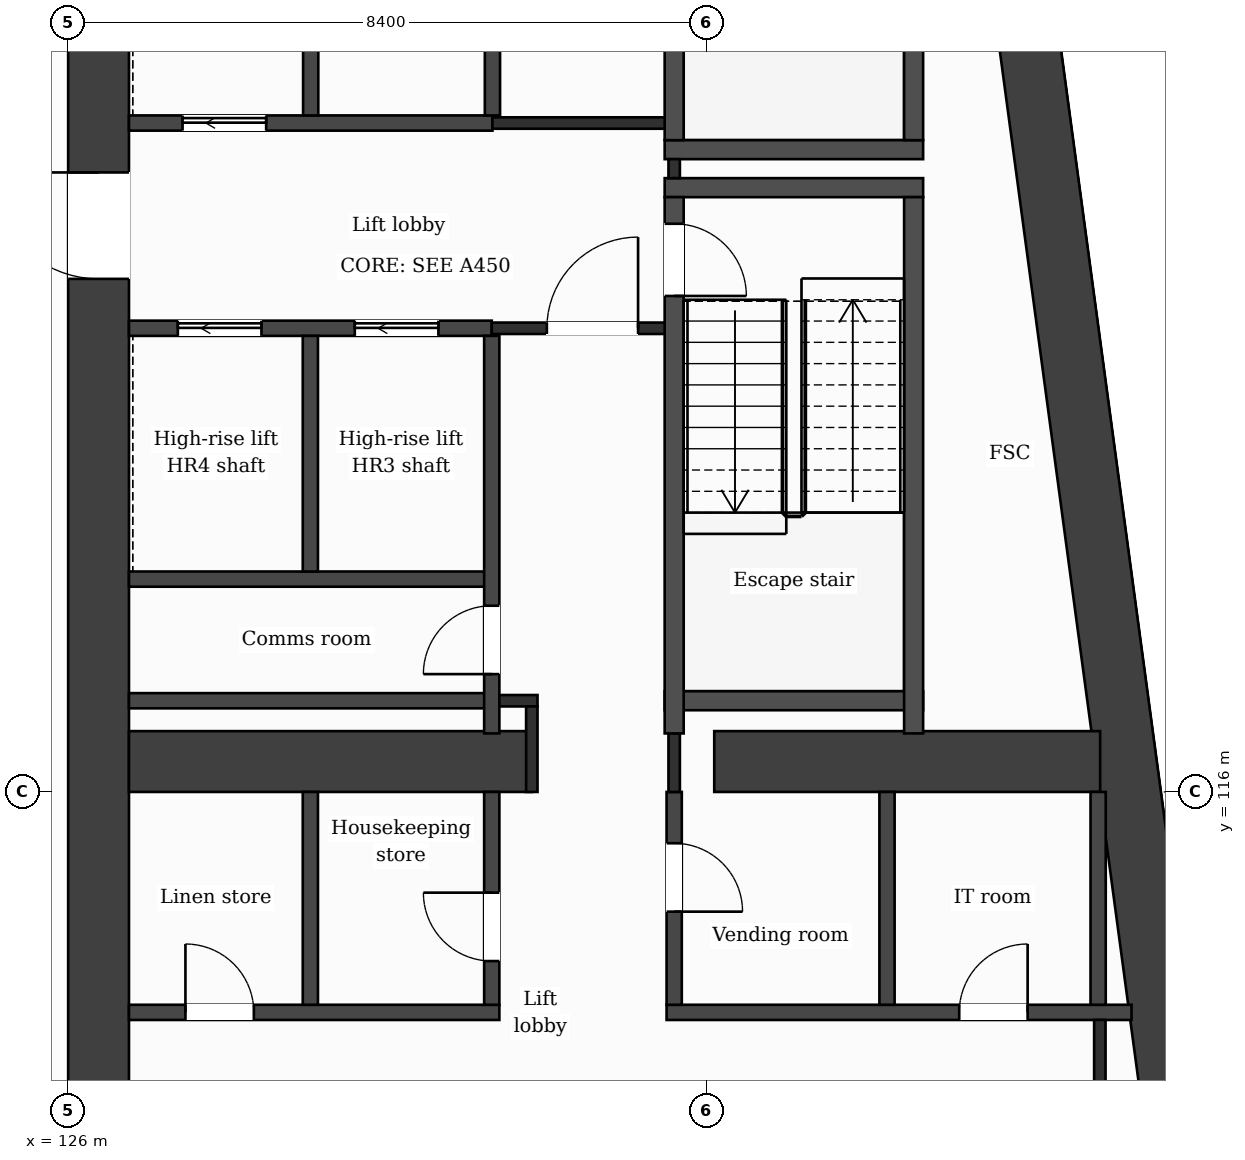
"""IFC4 building model, lengths in metres.
Left out: names, types, materials, properties, quantities, classifications, styles, units other than length and angle.
Written with IfcOpenShell. Run it as: python <this file> out.ifc"""

import sys

from ifc_helpers import new_model, si_unit, direction, frame, frame_2d, origin, place, context, subcontext, project, spatial, rectangle, extrude, element, fill, save


model = new_model("IFC4")
c1 = context("Model", 3, precision=1e-05, world=origin(), true_north=direction((0.0, 1.0)))
c2 = subcontext(c1, "Body", "Model", "MODEL_VIEW")
j1 = project(units=[si_unit("LENGTHUNIT", "METRE"), si_unit("PLANEANGLEUNIT", "RADIAN")], contexts=[c1])
p1 = place(None, origin())
s1 = spatial("IfcSite", under=j1, at=p1, CompositionType="ELEMENT")
p2 = place(p1, origin())
s2 = spatial("IfcBuilding", under=s1, at=p2, CompositionType="ELEMENT")
p3 = place(p2, frame((0.0, 0.0, 205.9)))
s3 = spatial("IfcBuildingStorey", under=s2, at=p3, CompositionType="ELEMENT", Elevation=205.9)
p4 = place(p3, frame((137.82, 132.0, 0.0), z_axis=(0.0, 0.0, 1.0), x_axis=(0.133408347329, -0.991061154956, 0.0)))
e1 = element("IfcWall", 1, at=p4, inside=s3, PredefinedType="SHEAR", context=c2, shape_type="SweptSolid", body=[
    extrude(rectangle(XDim=21.391, YDim=0.8, at=frame_2d((10.696, 0.0))), origin(), (0.0, 0.0, 1.0), 3.7),
])
p5 = place(p3, frame((126.4, 110.8, 0.0), z_axis=(0.0, 0.0, 1.0), x_axis=(0.0, 1.0, 0.0)))
e2 = element("IfcWall", 2, at=p5, inside=s3, PredefinedType="SHEAR", context=c2, shape_type="SweptSolid", body=[
    extrude(rectangle(XDim=21.2, YDim=0.8, at=frame_2d((10.6, 0.0))), origin(), (0.0, 0.0, 1.0), 3.7),
])
p6 = place(p5, frame((11.95, 0.0, 0.0)))
e3 = element("IfcOpeningElement", 3, at=p6, cuts=e2, PredefinedType="OPENING", context=c2, shape_type="SweptSolid", body=[
    extrude(rectangle(XDim=1.4, YDim=2.1, at=frame_2d((0.7, 1.05))), frame((0.0, 0.41, 0.0), z_axis=(0.0, -1.0, 0.0), x_axis=(1.0, 0.0, 0.0)), (0.0, 0.0, 1.0), 0.82),
])
p7 = place(p3, frame((126.8, 116.4, 0.0), z_axis=(0.0, 0.0, 1.0), x_axis=(1.0, 0.0, 0.0)))
e4 = element("IfcWall", 4, at=p7, inside=s3, PredefinedType="SHEAR", context=c2, shape_type="SweptSolid", body=[
    extrude(rectangle(XDim=5.3, YDim=0.8, at=frame_2d((2.65, 0.0))), origin(), (0.0, 0.0, 1.0), 3.7),
])
p8 = place(p3, frame((134.5, 116.4, 0.0), z_axis=(0.0, 0.0, 1.0), x_axis=(1.0, 0.0, 0.0)))
e5 = element("IfcWall", 5, at=p8, inside=s3, PredefinedType="SHEAR", context=c2, shape_type="SweptSolid", body=[
    extrude(rectangle(XDim=5.077, YDim=0.8, at=frame_2d((2.539, 0.0))), origin(), (0.0, 0.0, 1.0), 3.7),
])
p9 = place(p3, frame((126.8, 113.1, 0.0), z_axis=(0.0, 0.0, 1.0), x_axis=(1.0, 0.0, 0.0)))
e6 = element("IfcWall", 6, at=p9, inside=s3, PredefinedType="PARTITIONING", context=c2, shape_type="SweptSolid", body=[
    extrude(rectangle(XDim=4.873, YDim=0.2, at=frame_2d((2.437, 0.0))), origin(), (0.0, 0.0, 1.0), 3.38),
])
p10 = place(p9, frame((0.743, 0.0, 0.0)))
e7 = element("IfcOpeningElement", 7, at=p10, cuts=e6, PredefinedType="OPENING", context=c2, shape_type="SweptSolid", body=[
    extrude(rectangle(XDim=0.9, YDim=2.1, at=frame_2d((0.45, 1.05))), frame((0.0, 0.11, 0.0), z_axis=(0.0, -1.0, 0.0), x_axis=(1.0, 0.0, 0.0)), (0.0, 0.0, 1.0), 0.22),
])
p11 = place(p3, frame((133.873, 113.1, 0.0), z_axis=(0.0, 0.0, 1.0), x_axis=(1.0, 0.0, 0.0)))
e8 = element("IfcWall", 8, at=p11, inside=s3, PredefinedType="PARTITIONING", context=c2, shape_type="SweptSolid", body=[
    extrude(rectangle(XDim=6.117, YDim=0.2, at=frame_2d((3.059, 0.0))), origin(), (0.0, 0.0, 1.0), 3.38),
])
p12 = place(p11, frame((3.85, 0.0, 0.0)))
e9 = element("IfcOpeningElement", 9, at=p12, cuts=e8, PredefinedType="OPENING", context=c2, shape_type="SweptSolid", body=[
    extrude(rectangle(XDim=0.9, YDim=2.1, at=frame_2d((0.45, 1.05))), frame((0.0, 0.11, 0.0), z_axis=(0.0, -1.0, 0.0), x_axis=(1.0, 0.0, 0.0)), (0.0, 0.0, 1.0), 0.22),
])
p13 = place(p3, frame((126.8, 117.2, 0.0), z_axis=(0.0, 0.0, 1.0), x_axis=(1.0, 0.0, 0.0)))
e10 = element("IfcWall", 10, at=p13, inside=s3, PredefinedType="PARTITIONING", context=c2, shape_type="SweptSolid", body=[
    extrude(rectangle(XDim=4.773, YDim=0.2, at=frame_2d((2.386, 0.0))), origin(), (0.0, 0.0, 1.0), 3.38),
])
p14 = place(p3, frame((131.573, 117.2, 0.0), z_axis=(0.0, 0.0, 1.0), x_axis=(1.0, 0.0, 0.0)))
e11 = element("IfcWall", 11, at=p14, inside=s3, PredefinedType="PARTITIONING", context=c2, shape_type="SweptSolid", body=[
    extrude(rectangle(XDim=0.602, YDim=0.15, at=frame_2d((0.301, 0.0))), origin(), (0.0, 0.0, 1.0), 3.38),
])
p15 = place(p3, frame((133.848, 117.2, 0.0), z_axis=(0.0, 0.0, 1.0), x_axis=(1.0, 0.0, 0.0)))
e12 = element("IfcWall", 12, at=p15, inside=s3, PredefinedType="PARTITIONING", context=c2, shape_type="SweptSolid", body=[
    extrude(rectangle(XDim=3.4, YDim=0.25, at=frame_2d((1.7, 0.0))), origin(), (0.0, 0.0, 1.0), 3.38),
])
p16 = place(p3, frame((126.8, 118.8, 0.0), z_axis=(0.0, 0.0, 1.0), x_axis=(1.0, 0.0, 0.0)))
e13 = element("IfcWall", 13, at=p16, inside=s3, PredefinedType="PARTITIONING", context=c2, shape_type="SweptSolid", body=[
    extrude(rectangle(XDim=4.773, YDim=0.2, at=frame_2d((2.386, 0.0))), origin(), (0.0, 0.0, 1.0), 3.38),
])
p17 = place(p3, frame((126.8, 122.1, 0.0), z_axis=(0.0, 0.0, 1.0), x_axis=(1.0, 0.0, 0.0)))
e14 = element("IfcWall", 14, at=p17, inside=s3, PredefinedType="PARTITIONING", context=c2, shape_type="SweptSolid", body=[
    extrude(rectangle(XDim=4.773, YDim=0.2, at=frame_2d((2.386, 0.0))), origin(), (0.0, 0.0, 1.0), 3.38),
])
p18 = place(p17, frame((2.971, 0.0, 0.0)))
e15 = element("IfcOpeningElement", 15, at=p18, cuts=e14, PredefinedType="OPENING", context=c2, shape_type="SweptSolid", body=[
    extrude(rectangle(XDim=1.1, YDim=2.1, at=frame_2d((0.55, 1.05))), frame((0.0, 0.11, 0.0), z_axis=(0.0, -1.0, 0.0), x_axis=(1.0, 0.0, 0.0)), (0.0, 0.0, 1.0), 0.22),
])
p19 = place(p17, frame((0.643, 0.0, 0.0)))
e16 = element("IfcOpeningElement", 16, at=p19, cuts=e14, PredefinedType="OPENING", context=c2, shape_type="SweptSolid", body=[
    extrude(rectangle(XDim=1.1, YDim=2.1, at=frame_2d((0.55, 1.05))), frame((0.0, 0.11, 0.0), z_axis=(0.0, -1.0, 0.0), x_axis=(1.0, 0.0, 0.0)), (0.0, 0.0, 1.0), 0.22),
])
p20 = place(p3, frame((131.573, 122.1, 0.0), z_axis=(0.0, 0.0, 1.0), x_axis=(1.0, 0.0, 0.0)))
e17 = element("IfcWall", 17, at=p20, inside=s3, PredefinedType="PARTITIONING", context=c2, shape_type="SweptSolid", body=[
    extrude(rectangle(XDim=2.4, YDim=0.15, at=frame_2d((1.2, 0.0))), origin(), (0.0, 0.0, 1.0), 3.38),
])
p21 = place(p20, frame((0.725, 0.0, 0.0)))
e18 = element("IfcOpeningElement", 18, at=p21, cuts=e17, PredefinedType="OPENING", context=c2, shape_type="SweptSolid", body=[
    extrude(rectangle(XDim=1.2, YDim=2.1, at=frame_2d((0.6, 1.05))), frame((0.0, 0.085, 0.0), z_axis=(0.0, -1.0, 0.0), x_axis=(1.0, 0.0, 0.0)), (0.0, 0.0, 1.0), 0.17),
])
for number, where, z_axis, x_axis in (
    (19, (133.848, 123.95, 0.0), (0.0, 0.0, 1.0), (1.0, 0.0, 0.0)),
    (20, (133.848, 124.45, 0.0), (0.0, 0.0, 1.0), (1.0, 0.0, 0.0)),
):
    element("IfcWall", number, at=place(p3, frame(where, z_axis=z_axis, x_axis=x_axis)), inside=s3, PredefinedType="PARTITIONING", context=c2, shape_type="SweptSolid", body=[
        extrude(rectangle(XDim=3.4, YDim=0.25, at=frame_2d((1.7, 0.0))), origin(), (0.0, 0.0, 1.0), 3.38),
    ])
p22 = place(p3, frame((126.8, 124.8, 0.0), z_axis=(0.0, 0.0, 1.0), x_axis=(1.0, 0.0, 0.0)))
e21 = element("IfcWall", 21, at=p22, inside=s3, PredefinedType="PARTITIONING", context=c2, shape_type="SweptSolid", body=[
    extrude(rectangle(XDim=4.782, YDim=0.2, at=frame_2d((2.391, 0.0))), origin(), (0.0, 0.0, 1.0), 3.38),
])
p23 = place(p22, frame((0.705, 0.0, 0.0)))
e22 = element("IfcOpeningElement", 22, at=p23, cuts=e21, PredefinedType="OPENING", context=c2, shape_type="SweptSolid", body=[
    extrude(rectangle(XDim=1.1, YDim=2.1, at=frame_2d((0.55, 1.05))), frame((0.0, 0.11, 0.0), z_axis=(0.0, -1.0, 0.0), x_axis=(1.0, 0.0, 0.0)), (0.0, 0.0, 1.0), 0.22),
])
p24 = place(p3, frame((131.582, 124.8, 0.0), z_axis=(0.0, 0.0, 1.0), x_axis=(1.0, 0.0, 0.0)))
e23 = element("IfcWall", 23, at=p24, inside=s3, PredefinedType="PARTITIONING", context=c2, shape_type="SweptSolid", body=[
    extrude(rectangle(XDim=2.516, YDim=0.15, at=frame_2d((1.258, 0.0))), origin(), (0.0, 0.0, 1.0), 3.38),
])
p25 = place(p3, frame((129.187, 113.2, 0.0), z_axis=(0.0, 0.0, 1.0), x_axis=(0.0, 1.0, 0.0)))
e24 = element("IfcWall", 24, at=p25, inside=s3, PredefinedType="PARTITIONING", context=c2, shape_type="SweptSolid", body=[
    extrude(rectangle(XDim=2.8, YDim=0.2, at=frame_2d((1.4, 0.0))), origin(), (0.0, 0.0, 1.0), 3.38),
])
for number, where, z_axis, x_axis in (
    (25, (129.187, 118.9, 0.0), (0.0, 0.0, 1.0), (0.0, 1.0, 0.0)),
    (26, (129.191, 124.9, 0.0), (0.0, 0.0, 1.0), (0.0, 1.0, 0.0)),
):
    element("IfcWall", number, at=place(p3, frame(where, z_axis=z_axis, x_axis=x_axis)), inside=s3, PredefinedType="PARTITIONING", context=c2, shape_type="SweptSolid", body=[
        extrude(rectangle(XDim=3.1, YDim=0.2, at=frame_2d((1.55, 0.0))), origin(), (0.0, 0.0, 1.0), 3.38),
    ])
p26 = place(p3, frame((131.573, 113.2, 0.0), z_axis=(0.0, 0.0, 1.0), x_axis=(0.0, 1.0, 0.0)))
e27 = element("IfcWall", 27, at=p26, inside=s3, PredefinedType="PARTITIONING", context=c2, shape_type="SweptSolid", body=[
    extrude(rectangle(XDim=2.8, YDim=0.2, at=frame_2d((1.4, 0.0))), origin(), (0.0, 0.0, 1.0), 3.38),
])
p27 = place(p26, frame((0.575, 0.0, 0.0)))
e28 = element("IfcOpeningElement", 28, at=p27, cuts=e27, PredefinedType="OPENING", context=c2, shape_type="SweptSolid", body=[
    extrude(rectangle(XDim=0.9, YDim=2.1, at=frame_2d((0.45, 1.05))), frame((0.0, 0.11, 0.0), z_axis=(0.0, -1.0, 0.0), x_axis=(1.0, 0.0, 0.0)), (0.0, 0.0, 1.0), 0.22),
])
p28 = place(p3, frame((131.573, 116.77, 0.0), z_axis=(0.0, 0.0, 1.0), x_axis=(0.0, 1.0, 0.0)))
e29 = element("IfcWall", 29, at=p28, inside=s3, PredefinedType="PARTITIONING", context=c2, shape_type="SweptSolid", body=[
    extrude(rectangle(XDim=5.23, YDim=0.2, at=frame_2d((2.615, 0.0))), origin(), (0.0, 0.0, 1.0), 3.38),
])
p29 = place(p28, frame((0.78, 0.0, 0.0)))
e30 = element("IfcOpeningElement", 30, at=p29, cuts=e29, PredefinedType="OPENING", context=c2, shape_type="SweptSolid", body=[
    extrude(rectangle(XDim=0.9, YDim=2.1, at=frame_2d((0.45, 1.05))), frame((0.0, 0.11, 0.0), z_axis=(0.0, -1.0, 0.0), x_axis=(1.0, 0.0, 0.0)), (0.0, 0.0, 1.0), 0.22),
])
p30 = place(p3, frame((131.582, 124.9, 0.0), z_axis=(0.0, 0.0, 1.0), x_axis=(0.0, 1.0, 0.0)))
e31 = element("IfcWall", 31, at=p30, inside=s3, PredefinedType="PARTITIONING", context=c2, shape_type="SweptSolid", body=[
    extrude(rectangle(XDim=3.1, YDim=0.2, at=frame_2d((1.55, 0.0))), origin(), (0.0, 0.0, 1.0), 3.38),
])
p31 = place(p3, frame((132.1, 116.0, 0.0), z_axis=(0.0, 0.0, 1.0), x_axis=(0.0, 1.0, 0.0)))
e32 = element("IfcWall", 32, at=p31, inside=s3, PredefinedType="PARTITIONING", context=c2, shape_type="SweptSolid", body=[
    extrude(rectangle(XDim=1.125, YDim=0.15, at=frame_2d((0.562, 0.0))), origin(), (0.0, 0.0, 1.0), 3.38),
])
p32 = place(p3, frame((133.973, 113.2, 0.0), z_axis=(0.0, 0.0, 1.0), x_axis=(0.0, 1.0, 0.0)))
e33 = element("IfcWall", 33, at=p32, inside=s3, PredefinedType="PARTITIONING", context=c2, shape_type="SweptSolid", body=[
    extrude(rectangle(XDim=2.8, YDim=0.2, at=frame_2d((1.4, 0.0))), origin(), (0.0, 0.0, 1.0), 3.38),
])
p33 = place(p32, frame((1.225, 0.0, 0.0)))
e34 = element("IfcOpeningElement", 34, at=p33, cuts=e33, PredefinedType="OPENING", context=c2, shape_type="SweptSolid", body=[
    extrude(rectangle(XDim=0.9, YDim=2.1, at=frame_2d((0.45, 1.05))), frame((0.0, 0.11, 0.0), z_axis=(0.0, -1.0, 0.0), x_axis=(1.0, 0.0, 0.0)), (0.0, 0.0, 1.0), 0.22),
])
p34 = place(p3, frame((133.973, 116.0, 0.0), z_axis=(0.0, 0.0, 1.0), x_axis=(0.0, 1.0, 0.0)))
e35 = element("IfcWall", 35, at=p34, inside=s3, PredefinedType="PARTITIONING", context=c2, shape_type="SweptSolid", body=[
    extrude(rectangle(XDim=0.77, YDim=0.15, at=frame_2d((0.385, 0.0))), origin(), (0.0, 0.0, 1.0), 3.38),
])
p35 = place(p3, frame((133.973, 124.075, 0.0), z_axis=(0.0, 0.0, 1.0), x_axis=(0.0, 1.0, 0.0)))
e36 = element("IfcWall", 36, at=p35, inside=s3, PredefinedType="PARTITIONING", context=c2, shape_type="SweptSolid", body=[
    extrude(rectangle(XDim=0.25, YDim=0.15, at=frame_2d((0.125, 0.0))), origin(), (0.0, 0.0, 1.0), 3.38),
])
p36 = place(p3, frame((133.973, 116.77, 0.0), z_axis=(0.0, 0.0, 1.0), x_axis=(0.0, 1.0, 0.0)))
e37 = element("IfcWall", 37, at=p36, inside=s3, PredefinedType="PARTITIONING", context=c2, shape_type="SweptSolid", body=[
    extrude(rectangle(XDim=7.055, YDim=0.25, at=frame_2d((3.527, 0.0))), origin(), (0.0, 0.0, 1.0), 3.38),
])
p37 = place(p36, frame((5.755, 0.0, 0.0)))
e38 = element("IfcOpeningElement", 38, at=p37, cuts=e37, PredefinedType="OPENING", context=c2, shape_type="SweptSolid", body=[
    extrude(rectangle(XDim=0.95, YDim=2.1, at=frame_2d((0.475, 1.05))), frame((0.0, 0.135, 0.0), z_axis=(0.0, -1.0, 0.0), x_axis=(1.0, 0.0, 0.0)), (0.0, 0.0, 1.0), 0.27),
])
p38 = place(p3, frame((133.973, 124.575, 0.0), z_axis=(0.0, 0.0, 1.0), x_axis=(0.0, 1.0, 0.0)))
e39 = element("IfcWall", 39, at=p38, inside=s3, PredefinedType="PARTITIONING", context=c2, shape_type="SweptSolid", body=[
    extrude(rectangle(XDim=7.055, YDim=0.25, at=frame_2d((3.527, 0.0))), origin(), (0.0, 0.0, 1.0), 3.38),
])
p39 = place(p38, frame((5.325, 0.0, 0.0)))
e40 = element("IfcOpeningElement", 40, at=p39, cuts=e39, PredefinedType="OPENING", context=c2, shape_type="SweptSolid", body=[
    extrude(rectangle(XDim=1.0, YDim=2.1, at=frame_2d((0.5, 1.05))), frame((0.0, 0.135, 0.0), z_axis=(0.0, -1.0, 0.0), x_axis=(1.0, 0.0, 0.0)), (0.0, 0.0, 1.0), 0.27),
])
p40 = place(p3, frame((136.773, 113.2, 0.0), z_axis=(0.0, 0.0, 1.0), x_axis=(0.0, 1.0, 0.0)))
e41 = element("IfcWall", 41, at=p40, inside=s3, PredefinedType="PARTITIONING", context=c2, shape_type="SweptSolid", body=[
    extrude(rectangle(XDim=2.8, YDim=0.2, at=frame_2d((1.4, 0.0))), origin(), (0.0, 0.0, 1.0), 3.38),
])
for number, where, z_axis, x_axis in (
    (42, (137.123, 116.77, 0.0), (0.0, 0.0, 1.0), (0.0, 1.0, 0.0)),
    (43, (137.123, 124.575, 0.0), (0.0, 0.0, 1.0), (0.0, 1.0, 0.0)),
):
    element("IfcWall", number, at=place(p3, frame(where, z_axis=z_axis, x_axis=x_axis)), inside=s3, PredefinedType="PARTITIONING", context=c2, shape_type="SweptSolid", body=[
        extrude(rectangle(XDim=7.055, YDim=0.25, at=frame_2d((3.527, 0.0))), origin(), (0.0, 0.0, 1.0), 3.38),
    ])
p41 = place(p3, frame((139.551, 113.2, 0.0), z_axis=(0.0, 0.0, 1.0), x_axis=(0.0, 1.0, 0.0)))
e44 = element("IfcWall", 44, at=p41, inside=s3, PredefinedType="PARTITIONING", context=c2, shape_type="SweptSolid", body=[
    extrude(rectangle(XDim=2.8, YDim=0.2, at=frame_2d((1.4, 0.0))), origin(), (0.0, 0.0, 1.0), 3.38),
])
p42 = place(p3, frame((139.573, 111.2, 0.0), z_axis=(0.0, 0.0, 1.0), x_axis=(0.0, 1.0, 0.0)))
e45 = element("IfcWall", 45, at=p42, inside=s3, PredefinedType="PARTITIONING", context=c2, shape_type="SweptSolid", body=[
    extrude(rectangle(XDim=1.8, YDim=0.15, at=frame_2d((0.9, 0.0))), origin(), (0.0, 0.0, 1.0), 3.38),
])
p43 = place(p21, origin())
e46 = element("IfcDoor", 46, at=p43, inside=s3, OperationType="SINGLE_SWING_RIGHT", PredefinedType="DOOR", context=c2, shape_type="SweptSolid", body=[
    extrude(rectangle(XDim=1.2, YDim=2.1, at=frame_2d((0.6, 1.05))), frame((0.0, 0.025, 0.0), z_axis=(0.0, -1.0, 0.0), x_axis=(1.0, 0.0, 0.0)), (0.0, 0.0, 1.0), 0.05),
])
fill(e18, e46)
p44 = place(p18, origin())
e47 = element("IfcDoor", 47, at=p44, inside=s3, OperationType="SLIDING_TO_LEFT", PredefinedType="DOOR", context=c2, shape_type="SweptSolid", body=[
    extrude(rectangle(XDim=1.1, YDim=2.1, at=frame_2d((0.55, 1.05))), frame((0.0, 0.025, 0.0), z_axis=(0.0, -1.0, 0.0), x_axis=(1.0, 0.0, 0.0)), (0.0, 0.0, 1.0), 0.05),
])
fill(e15, e47)
p45 = place(p19, origin())
e48 = element("IfcDoor", 48, at=p45, inside=s3, OperationType="SLIDING_TO_LEFT", PredefinedType="DOOR", context=c2, shape_type="SweptSolid", body=[
    extrude(rectangle(XDim=1.1, YDim=2.1, at=frame_2d((0.55, 1.05))), frame((0.0, 0.025, 0.0), z_axis=(0.0, -1.0, 0.0), x_axis=(1.0, 0.0, 0.0)), (0.0, 0.0, 1.0), 0.05),
])
fill(e16, e48)
p46 = place(p23, origin())
e49 = element("IfcDoor", 49, at=p46, inside=s3, OperationType="SLIDING_TO_LEFT", PredefinedType="DOOR", context=c2, shape_type="SweptSolid", body=[
    extrude(rectangle(XDim=1.1, YDim=2.1, at=frame_2d((0.55, 1.05))), frame((0.0, 0.025, 0.0), z_axis=(0.0, -1.0, 0.0), x_axis=(1.0, 0.0, 0.0)), (0.0, 0.0, 1.0), 0.05),
])
fill(e22, e49)
p47 = place(p37, origin())
e50 = element("IfcDoor", 50, at=p47, inside=s3, OperationType="SINGLE_SWING_LEFT", PredefinedType="DOOR", context=c2, shape_type="SweptSolid", body=[
    extrude(rectangle(XDim=0.95, YDim=2.1, at=frame_2d((0.475, 1.05))), frame((0.0, 0.025, 0.0), z_axis=(0.0, -1.0, 0.0), x_axis=(1.0, 0.0, 0.0)), (0.0, 0.0, 1.0), 0.05),
])
fill(e38, e50)
p48 = place(p29, origin())
e51 = element("IfcDoor", 51, at=p48, inside=s3, OperationType="SINGLE_SWING_LEFT", PredefinedType="DOOR", context=c2, shape_type="SweptSolid", body=[
    extrude(rectangle(XDim=0.9, YDim=2.1, at=frame_2d((0.45, 1.05))), frame((0.0, 0.025, 0.0), z_axis=(0.0, -1.0, 0.0), x_axis=(1.0, 0.0, 0.0)), (0.0, 0.0, 1.0), 0.05),
])
fill(e30, e51)
p49 = place(p12, origin())
e52 = element("IfcDoor", 52, at=p49, inside=s3, OperationType="SINGLE_SWING_RIGHT", PredefinedType="DOOR", context=c2, shape_type="SweptSolid", body=[
    extrude(rectangle(XDim=0.9, YDim=2.1, at=frame_2d((0.45, 1.05))), frame((0.0, 0.025, 0.0), z_axis=(0.0, -1.0, 0.0), x_axis=(1.0, 0.0, 0.0)), (0.0, 0.0, 1.0), 0.05),
])
fill(e9, e52)
p50 = place(p33, origin())
e53 = element("IfcDoor", 53, at=p50, inside=s3, OperationType="SINGLE_SWING_LEFT", PredefinedType="DOOR", context=c2, shape_type="SweptSolid", body=[
    extrude(rectangle(XDim=0.9, YDim=2.1, at=frame_2d((0.45, 1.05))), frame((0.0, 0.025, 0.0), z_axis=(0.0, -1.0, 0.0), x_axis=(1.0, 0.0, 0.0)), (0.0, 0.0, 1.0), 0.05),
])
fill(e34, e53)
p51 = place(p27, origin())
e54 = element("IfcDoor", 54, at=p51, inside=s3, OperationType="SINGLE_SWING_RIGHT", PredefinedType="DOOR", context=c2, shape_type="SweptSolid", body=[
    extrude(rectangle(XDim=0.9, YDim=2.1, at=frame_2d((0.45, 1.05))), frame((0.0, 0.025, 0.0), z_axis=(0.0, -1.0, 0.0), x_axis=(1.0, 0.0, 0.0)), (0.0, 0.0, 1.0), 0.05),
])
fill(e28, e54)
p52 = place(p10, origin())
e55 = element("IfcDoor", 55, at=p52, inside=s3, OperationType="SINGLE_SWING_LEFT", PredefinedType="DOOR", context=c2, shape_type="SweptSolid", body=[
    extrude(rectangle(XDim=0.9, YDim=2.1, at=frame_2d((0.45, 1.05))), frame((0.0, 0.025, 0.0), z_axis=(0.0, -1.0, 0.0), x_axis=(1.0, 0.0, 0.0)), (0.0, 0.0, 1.0), 0.05),
])
fill(e7, e55)
p53 = place(p6, origin())
e56 = element("IfcDoor", 56, at=p53, inside=s3, OperationType="SINGLE_SWING_RIGHT", PredefinedType="DOOR", context=c2, shape_type="SweptSolid", body=[
    extrude(rectangle(XDim=1.4, YDim=2.1, at=frame_2d((0.7, 1.05))), frame((0.0, 0.025, 0.0), z_axis=(0.0, -1.0, 0.0), x_axis=(1.0, 0.0, 0.0)), (0.0, 0.0, 1.0), 0.05),
])
fill(e3, e56)
save(model, sys.argv[1])
